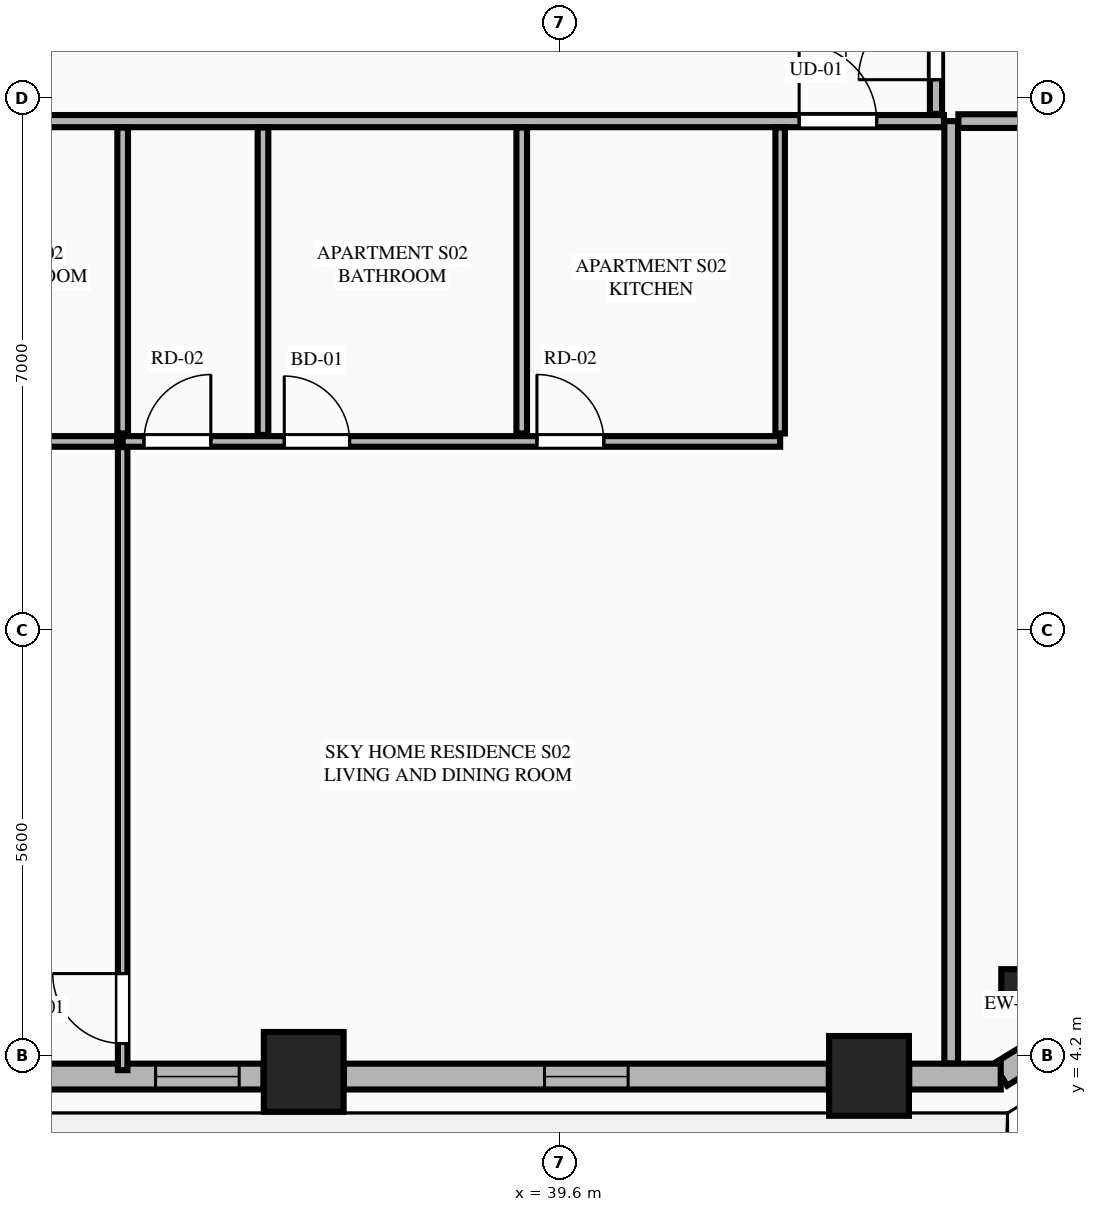
"""IFC4 building model, lengths in metres.
Left out: names, types, materials, properties, quantities, classifications, styles, units other than length and angle.
Written with IfcOpenShell. Run it as: python <this file> out.ifc"""

import sys

from ifc_helpers import new_model, si_unit, direction, frame, frame_2d, origin, origin_2d, place, context, subcontext, project, spatial, rectangle, extrude, element, fill, save


model = new_model("IFC4")
c1 = context("Model", 3, precision=1e-05, world=origin(), true_north=direction((0.0, 1.0)))
c2 = subcontext(c1, "Body", "Model", "MODEL_VIEW")
j1 = project(units=[si_unit("LENGTHUNIT", "METRE"), si_unit("PLANEANGLEUNIT", "RADIAN")], contexts=[c1])
p1 = place(None, origin())
s1 = spatial("IfcSite", under=j1, at=p1, CompositionType="ELEMENT")
p2 = place(p1, origin())
s2 = spatial("IfcBuilding", under=s1, at=p2, CompositionType="ELEMENT")
p3 = place(p2, frame((0.0, 0.0, 116.15)))
s3 = spatial("IfcBuildingStorey", under=s2, at=p3, CompositionType="ELEMENT", Elevation=116.15)
for number, where, z_axis, x_axis in (
    (1, (36.232, 3.992, 0.0), (0.0, 0.0, 1.0), (1.0, 0.0, 0.0)),
    (2, (43.669, 3.939, 0.0), (0.0, 0.0, 1.0), (1.0, 0.0, 0.0)),
):
    element("IfcColumn", number, at=place(p3, frame(where, z_axis=z_axis, x_axis=x_axis)), inside=s3, PredefinedType="COLUMN", context=c2, shape_type="SweptSolid", body=[
        extrude(rectangle(XDim=1.05, YDim=1.05, at=origin_2d()), origin(), (0.0, 0.0, 1.0), 3.55),
    ])
p4 = place(p3, frame((45.659, 5.093, 0.0), z_axis=(0.0, 0.0, 1.0), x_axis=(0.865160173452, 0.501495637342, 0.0)))
e3 = element("IfcColumn", 3, at=p4, inside=s3, PredefinedType="PILASTER", context=c2, shape_type="SweptSolid", body=[
    extrude(rectangle(XDim=0.5, YDim=0.35, at=origin_2d()), origin(), (0.0, 0.0, 1.0), 3.55),
])
p5 = place(p3, frame((45.397, 3.955, 0.0), z_axis=(0.0, 0.0, 1.0), x_axis=(0.851798915137, 0.523868884523, 0.0)))
e4 = element("IfcWall", 4, at=p5, inside=s3, PredefinedType="STANDARD", context=c2, shape_type="SweptSolid", body=[
    extrude(rectangle(XDim=1.848, YDim=0.34, at=frame_2d((0.924, 0.0))), origin(), (0.0, 0.0, 1.0), 3.34),
])
p6 = place(p3, frame((29.097, 3.93, 0.0), z_axis=(0.0, 0.0, 1.0), x_axis=(1.0, 0.0, 0.0)))
e5 = element("IfcWall", 5, at=p6, inside=s3, PredefinedType="STANDARD", context=c2, shape_type="SweptSolid", body=[
    extrude(rectangle(XDim=6.606, YDim=0.34, at=frame_2d((3.303, 0.0))), origin(), (0.0, 0.0, 1.0), 2.797),
])
p7 = place(p6, frame((1.775, 0.0, 0.0)))
e6 = element("IfcOpeningElement", 6, at=p7, cuts=e5, PredefinedType="OPENING", context=c2, shape_type="SweptSolid", body=[
    extrude(rectangle(XDim=1.1, YDim=2.25, at=frame_2d((0.55, 1.125))), frame((0.0, 0.18, 0.0), z_axis=(0.0, -1.0, 0.0), x_axis=(1.0, 0.0, 0.0)), (0.0, 0.0, 1.0), 0.36),
])
p8 = place(p6, frame((5.186, 0.0, 0.75)))
e7 = element("IfcOpeningElement", 7, at=p8, cuts=e5, PredefinedType="OPENING", context=c2, shape_type="SweptSolid", body=[
    extrude(rectangle(XDim=1.1, YDim=1.897, at=frame_2d((0.55, 0.948))), frame((0.0, 0.18, 0.0), z_axis=(0.0, -1.0, 0.0), x_axis=(1.0, 0.0, 0.0)), (0.0, 0.0, 1.0), 0.36),
])
p9 = place(p3, frame((36.761, 3.93, 0.0), z_axis=(0.0, 0.0, 1.0), x_axis=(1.0, 0.0, 0.0)))
e8 = element("IfcWall", 8, at=p9, inside=s3, PredefinedType="STANDARD", context=c2, shape_type="SweptSolid", body=[
    extrude(rectangle(XDim=6.379, YDim=0.34, at=frame_2d((3.189, 0.0))), origin(), (0.0, 0.0, 1.0), 2.797),
])
p10 = place(p9, frame((2.639, 0.0, 0.75)))
e9 = element("IfcOpeningElement", 9, at=p10, cuts=e8, PredefinedType="OPENING", context=c2, shape_type="SweptSolid", body=[
    extrude(rectangle(XDim=1.1, YDim=1.897, at=frame_2d((0.55, 0.948))), frame((0.0, 0.18, 0.0), z_axis=(0.0, -1.0, 0.0), x_axis=(1.0, 0.0, 0.0)), (0.0, 0.0, 1.0), 0.36),
])
p11 = place(p3, frame((44.198, 3.93, 0.0), z_axis=(0.0, 0.0, 1.0), x_axis=(1.0, 0.0, 0.0)))
e10 = element("IfcWall", 10, at=p11, inside=s3, PredefinedType="STANDARD", context=c2, shape_type="SweptSolid", body=[
    extrude(rectangle(XDim=1.204, YDim=0.34, at=frame_2d((0.602, 0.0))), origin(), (0.0, 0.0, 1.0), 3.34),
])
p12 = place(p3, frame((44.75, 4.105, 0.0), z_axis=(0.0, 0.0, 1.0), x_axis=(0.0, 1.0, 0.0)))
e11 = element("IfcWall", 11, at=p12, inside=s3, PredefinedType="PARTITIONING", context=c2, shape_type="SweptSolid", body=[
    extrude(rectangle(XDim=12.395, YDim=0.18, at=frame_2d((6.198, 0.0))), origin(), (0.0, 0.0, 1.0), 3.34),
])
p13 = place(p3, frame((28.663, 16.5, 0.0), z_axis=(0.0, 0.0, 1.0), x_axis=(1.0, 0.0, 0.0)))
e12 = element("IfcWall", 12, at=p13, inside=s3, PredefinedType="PARTITIONING", context=c2, shape_type="SweptSolid", body=[
    extrude(rectangle(XDim=15.992, YDim=0.16, at=frame_2d((7.996, 0.0))), origin(), (0.0, 0.0, 1.0), 3.34),
])
p14 = place(p13, frame((14.087, 0.0, 0.0)))
e13 = element("IfcOpeningElement", 13, at=p14, cuts=e12, PredefinedType="OPENING", context=c2, shape_type="SweptSolid", body=[
    extrude(rectangle(XDim=1.02, YDim=2.25, at=frame_2d((0.51, 1.125))), frame((0.0, 0.09, 0.0), z_axis=(0.0, -1.0, 0.0), x_axis=(1.0, 0.0, 0.0)), (0.0, 0.0, 1.0), 0.18),
])
p15 = place(p3, frame((42.5, 12.391, 0.0), z_axis=(0.0, 0.0, 1.0), x_axis=(0.0, 1.0, 0.0)))
e14 = element("IfcWall", 14, at=p15, inside=s3, PredefinedType="PARTITIONING", context=c2, shape_type="SweptSolid", body=[
    extrude(rectangle(XDim=4.024, YDim=0.125, at=frame_2d((2.012, 0.0))), origin(), (0.0, 0.0, 1.0), 2.722),
])
p16 = place(p3, frame((33.85, 12.286, 0.0), z_axis=(0.0, 0.0, 1.0), x_axis=(1.0, 0.0, 0.0)))
e15 = element("IfcWall", 15, at=p16, inside=s3, PredefinedType="PLUMBINGWALL", context=c2, shape_type="SweptSolid", body=[
    extrude(rectangle(XDim=8.65, YDim=0.14, at=frame_2d((4.325, 0.0))), origin(), (0.0, 0.0, 1.0), 3.34),
])
p17 = place(p16, frame((0.28, 0.0, 0.0)))
e16 = element("IfcOpeningElement", 16, at=p17, cuts=e15, PredefinedType="OPENING", context=c2, shape_type="SweptSolid", body=[
    extrude(rectangle(XDim=0.88, YDim=2.15, at=frame_2d((0.44, 1.075))), frame((0.0, 0.08, 0.0), z_axis=(0.0, -1.0, 0.0), x_axis=(1.0, 0.0, 0.0)), (0.0, 0.0, 1.0), 0.16),
])
p18 = place(p16, frame((2.126, 0.0, 0.0)))
e17 = element("IfcOpeningElement", 17, at=p18, cuts=e15, PredefinedType="OPENING", context=c2, shape_type="SweptSolid", body=[
    extrude(rectangle(XDim=0.86, YDim=2.1, at=frame_2d((0.43, 1.05))), frame((0.0, 0.08, 0.0), z_axis=(0.0, -1.0, 0.0), x_axis=(1.0, 0.0, 0.0)), (0.0, 0.0, 1.0), 0.16),
])
p19 = place(p16, frame((5.45, 0.0, 0.0)))
e18 = element("IfcOpeningElement", 18, at=p19, cuts=e15, PredefinedType="OPENING", context=c2, shape_type="SweptSolid", body=[
    extrude(rectangle(XDim=0.88, YDim=2.15, at=frame_2d((0.44, 1.075))), frame((0.0, 0.08, 0.0), z_axis=(0.0, -1.0, 0.0), x_axis=(1.0, 0.0, 0.0)), (0.0, 0.0, 1.0), 0.16),
])
p20 = place(p3, frame((28.663, 12.286, 0.0), z_axis=(0.0, 0.0, 1.0), x_axis=(1.0, 0.0, 0.0)))
e19 = element("IfcWall", 19, at=p20, inside=s3, PredefinedType="PLUMBINGWALL", context=c2, shape_type="SweptSolid", body=[
    extrude(rectangle(XDim=5.112, YDim=0.14, at=frame_2d((2.556, 0.0))), origin(), (0.0, 0.0, 1.0), 3.34),
])
p21 = place(p20, frame((0.28, 0.0, 0.0)))
e20 = element("IfcOpeningElement", 20, at=p21, cuts=e19, PredefinedType="OPENING", context=c2, shape_type="SweptSolid", body=[
    extrude(rectangle(XDim=0.88, YDim=2.15, at=frame_2d((0.44, 1.075))), frame((0.0, 0.08, 0.0), z_axis=(0.0, -1.0, 0.0), x_axis=(1.0, 0.0, 0.0)), (0.0, 0.0, 1.0), 0.16),
])
p22 = place(p20, frame((1.988, 0.0, 0.0)))
e21 = element("IfcOpeningElement", 21, at=p22, cuts=e19, PredefinedType="OPENING", context=c2, shape_type="SweptSolid", body=[
    extrude(rectangle(XDim=0.86, YDim=2.1, at=frame_2d((0.43, 1.05))), frame((0.0, 0.08, 0.0), z_axis=(0.0, -1.0, 0.0), x_axis=(1.0, 0.0, 0.0)), (0.0, 0.0, 1.0), 0.16),
])
for number, where, z_axis, x_axis in (
    (22, (39.1, 12.391, 0.0), (0.0, 0.0, 1.0), (0.0, 1.0, 0.0)),
    (23, (33.85, 12.391, 0.0), (0.0, 0.0, 1.0), (0.0, 1.0, 0.0)),
):
    element("IfcWall", number, at=place(p3, frame(where, z_axis=z_axis, x_axis=x_axis)), inside=s3, PredefinedType="PLUMBINGWALL", context=c2, shape_type="SweptSolid", body=[
        extrude(rectangle(XDim=4.024, YDim=0.14, at=frame_2d((2.012, 0.0))), origin(), (0.0, 0.0, 1.0), 3.34),
    ])
p23 = place(p3, frame((33.85, 4.015, 0.0), z_axis=(0.0, 0.0, 1.0), x_axis=(0.0, 1.0, 0.0)))
e24 = element("IfcWall", 24, at=p23, inside=s3, PredefinedType="PARTITIONING", context=c2, shape_type="SweptSolid", body=[
    extrude(rectangle(XDim=8.196, YDim=0.125, at=frame_2d((4.098, 0.0))), origin(), (0.0, 0.0, 1.0), 3.34),
])
p24 = place(p23, frame((0.35, 0.0, 0.0)))
e25 = element("IfcOpeningElement", 25, at=p24, cuts=e24, PredefinedType="OPENING", context=c2, shape_type="SweptSolid", body=[
    extrude(rectangle(XDim=0.92, YDim=2.15, at=frame_2d((0.46, 1.075))), frame((0.0, 0.073, 0.0), z_axis=(0.0, -1.0, 0.0), x_axis=(1.0, 0.0, 0.0)), (0.0, 0.0, 1.0), 0.145),
])
p25 = place(p3, frame((35.696, 12.371, 0.0), z_axis=(0.0, 0.0, 1.0), x_axis=(0.0, 1.0, 0.0)))
e26 = element("IfcWall", 26, at=p25, inside=s3, PredefinedType="PLUMBINGWALL", context=c2, shape_type="SweptSolid", body=[
    extrude(rectangle(XDim=4.044, YDim=0.14, at=frame_2d((2.022, 0.0))), origin(), (0.0, 0.0, 1.0), 3.34),
])
p26 = place(p3, frame((44.845, 16.5, 0.0), z_axis=(0.0, 0.0, 1.0), x_axis=(1.0, 0.0, 0.0)))
e27 = element("IfcWall", 27, at=p26, inside=s3, PredefinedType="PARTITIONING", context=c2, shape_type="SweptSolid", body=[
    extrude(rectangle(XDim=7.77, YDim=0.18, at=frame_2d((3.885, 0.0))), origin(), (0.0, 0.0, 1.0), 3.34),
])
p27 = place(p3, frame((44.55, 16.595, 0.0), z_axis=(0.0, 0.0, 1.0), x_axis=(0.0, 1.0, 0.0)))
e28 = element("IfcWall", 28, at=p27, inside=s3, PredefinedType="PARTITIONING", context=c2, shape_type="SweptSolid", body=[
    extrude(rectangle(XDim=18.61, YDim=0.16, at=frame_2d((9.305, 0.0))), origin(), (0.0, 0.0, 1.0), 3.34),
])
p28 = place(p27, frame((0.45, 0.0, 0.0)))
e29 = element("IfcOpeningElement", 29, at=p28, cuts=e28, PredefinedType="OPENING", context=c2, shape_type="SweptSolid", body=[
    extrude(rectangle(XDim=1.02, YDim=2.25, at=frame_2d((0.51, 1.125))), frame((0.0, 0.09, 0.0), z_axis=(0.0, -1.0, 0.0), x_axis=(1.0, 0.0, 0.0)), (0.0, 0.0, 1.0), 0.18),
])
p29 = place(p10, origin())
e30 = element("IfcWindow", 30, at=p29, inside=s3, PartitioningType="SINGLE_PANEL", PredefinedType="WINDOW", context=c2, shape_type="SweptSolid", body=[
    extrude(rectangle(XDim=1.1, YDim=1.897, at=frame_2d((0.55, 0.948))), frame((0.0, 0.03, 0.0), z_axis=(0.0, -1.0, 0.0), x_axis=(1.0, 0.0, 0.0)), (0.0, 0.0, 1.0), 0.06),
])
fill(e9, e30)
p30 = place(p17, origin())
e31 = element("IfcDoor", 31, at=p30, inside=s3, OperationType="SINGLE_SWING_RIGHT", PredefinedType="DOOR", context=c2, shape_type="SweptSolid", body=[
    extrude(rectangle(XDim=0.88, YDim=2.15, at=frame_2d((0.44, 1.075))), frame((0.0, 0.025, 0.0), z_axis=(0.0, -1.0, 0.0), x_axis=(1.0, 0.0, 0.0)), (0.0, 0.0, 1.0), 0.05),
])
fill(e16, e31)
p31 = place(p18, origin())
e32 = element("IfcDoor", 32, at=p31, inside=s3, OperationType="SINGLE_SWING_LEFT", PredefinedType="DOOR", context=c2, shape_type="SweptSolid", body=[
    extrude(rectangle(XDim=0.86, YDim=2.1, at=frame_2d((0.43, 1.05))), frame((0.0, 0.025, 0.0), z_axis=(0.0, -1.0, 0.0), x_axis=(1.0, 0.0, 0.0)), (0.0, 0.0, 1.0), 0.05),
])
fill(e17, e32)
p32 = place(p14, origin())
e33 = element("IfcDoor", 33, at=p32, inside=s3, OperationType="SINGLE_SWING_LEFT", PredefinedType="DOOR", context=c2, shape_type="SweptSolid", body=[
    extrude(rectangle(XDim=1.02, YDim=2.25, at=frame_2d((0.51, 1.125))), frame((0.0, 0.025, 0.0), z_axis=(0.0, -1.0, 0.0), x_axis=(1.0, 0.0, 0.0)), (0.0, 0.0, 1.0), 0.05),
])
fill(e13, e33)
p33 = place(p19, origin())
e34 = element("IfcDoor", 34, at=p33, inside=s3, OperationType="SINGLE_SWING_LEFT", PredefinedType="DOOR", context=c2, shape_type="SweptSolid", body=[
    extrude(rectangle(XDim=0.88, YDim=2.15, at=frame_2d((0.44, 1.075))), frame((0.0, 0.025, 0.0), z_axis=(0.0, -1.0, 0.0), x_axis=(1.0, 0.0, 0.0)), (0.0, 0.0, 1.0), 0.05),
])
fill(e18, e34)
p34 = place(p24, origin())
e35 = element("IfcDoor", 35, at=p34, inside=s3, OperationType="SINGLE_SWING_RIGHT", PredefinedType="DOOR", context=c2, shape_type="SweptSolid", body=[
    extrude(rectangle(XDim=0.92, YDim=2.15, at=frame_2d((0.46, 1.075))), frame((0.0, 0.025, 0.0), z_axis=(0.0, -1.0, 0.0), x_axis=(1.0, 0.0, 0.0)), (0.0, 0.0, 1.0), 0.05),
])
fill(e25, e35)
p35 = place(p28, origin())
e36 = element("IfcDoor", 36, at=p35, inside=s3, OperationType="SINGLE_SWING_LEFT", PredefinedType="DOOR", context=c2, shape_type="SweptSolid", body=[
    extrude(rectangle(XDim=1.02, YDim=2.25, at=frame_2d((0.51, 1.125))), frame((0.0, 0.025, 0.0), z_axis=(0.0, -1.0, 0.0), x_axis=(1.0, 0.0, 0.0)), (0.0, 0.0, 1.0), 0.05),
])
fill(e29, e36)
p36 = place(p8, origin())
e37 = element("IfcWindow", 37, at=p36, inside=s3, PartitioningType="SINGLE_PANEL", PredefinedType="WINDOW", context=c2, shape_type="SweptSolid", body=[
    extrude(rectangle(XDim=1.1, YDim=1.897, at=frame_2d((0.55, 0.948))), frame((0.0, 0.03, 0.0), z_axis=(0.0, -1.0, 0.0), x_axis=(1.0, 0.0, 0.0)), (0.0, 0.0, 1.0), 0.06),
])
fill(e7, e37)
save(model, sys.argv[1])
